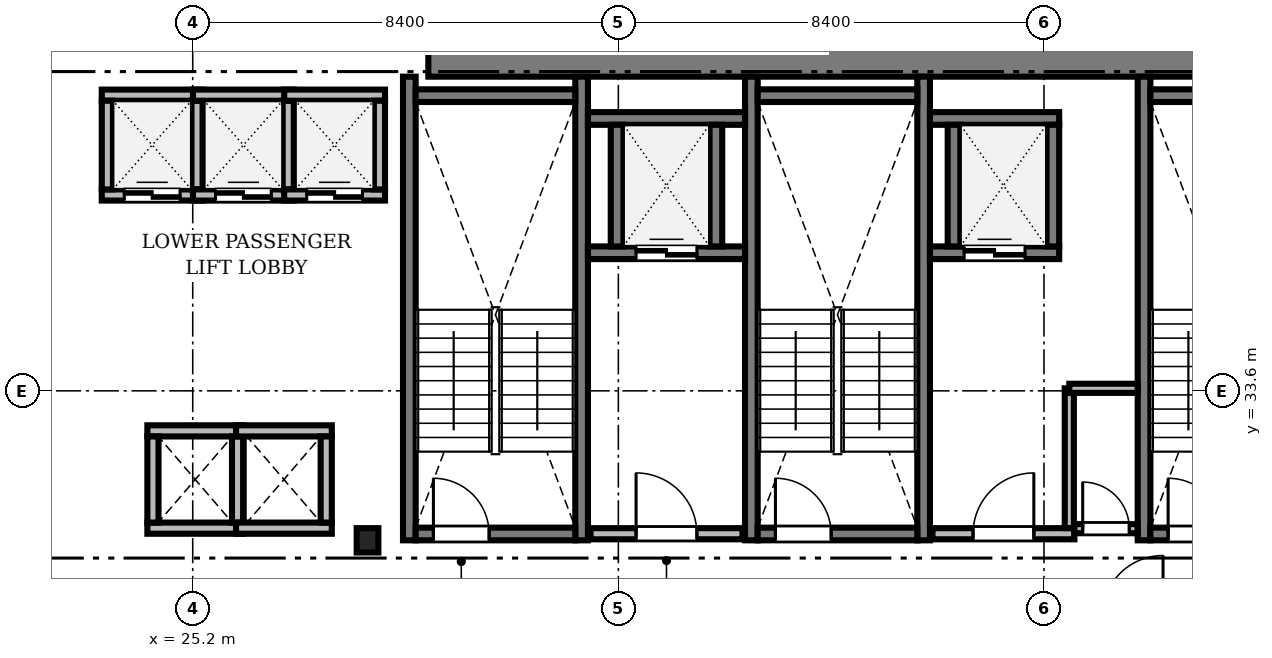
"""IFC4 building model, lengths in metres.
Left out: names, types, materials, properties, quantities, classifications, styles, units other than length and angle.
Written with IfcOpenShell. Run it as: python <this file> out.ifc"""

import sys

from ifc_helpers import new_model, si_unit, direction, frame, frame_2d, origin, origin_2d, place, context, subcontext, project, spatial, rectangle, i_section, extrude, source, transform, mapped, element, fill, save


model = new_model("IFC4")
c1 = context("Model", 3, precision=1e-05, world=origin(), true_north=direction((0.0, 1.0)))
c2 = subcontext(c1, "Body", "Model", "MODEL_VIEW")
j1 = project(units=[si_unit("LENGTHUNIT", "METRE"), si_unit("PLANEANGLEUNIT", "RADIAN")], contexts=[c1])
p1 = place(None, origin())
s1 = spatial("IfcSite", under=j1, at=p1, CompositionType="ELEMENT")
p2 = place(p1, origin())
s2 = spatial("IfcBuilding", under=s1, at=p2, CompositionType="ELEMENT")
p3 = place(p2, frame((0.0, 0.0, 49.5)))
s3 = spatial("IfcBuildingStorey", under=s2, at=p3, CompositionType="ELEMENT", Elevation=49.5)
m1 = source(origin(), c2, "Body", "SweptSolid", [
    extrude(rectangle(XDim=17.52, YDim=1.0, at=frame_2d((8.76, 0.0))), origin(), (0.0, 0.0, 1.0), 3.41),
])
p4 = place(p3, frame((29.85, 40.3, 0.0), z_axis=(0.0, 0.0, 1.0), x_axis=(1.0, 0.0, 0.0)))
e1 = element("IfcWall", 1, at=p4, inside=s3, PredefinedType="SHEAR", context=c2, shape_type="MappedRepresentation", body=[
    mapped(m1, transform((0.0, 0.0, 0.0), scale=1.0)),
])
m2 = source(origin(), c2, "Body", "SweptSolid", [
    extrude(i_section(OverallWidth=0.428, OverallDepth=0.481, WebThickness=0.04, FlangeThickness=0.063, FilletRadius=0.015, at=origin_2d()), origin(), (0.0, 0.0, 1.0), 3.41),
])
p5 = place(p3, frame((28.65, 30.65, 0.0), z_axis=(0.0, 0.0, 1.0), x_axis=(1.0, 0.0, 0.0)))
e2 = element("IfcColumn", 2, at=p5, inside=s3, PredefinedType="COLUMN", context=c2, shape_type="MappedRepresentation", body=[
    mapped(m2, transform((0.0, 0.0, 0.0), scale=1.0)),
])
m3 = source(origin(), c2, "Body", "SweptSolid", [
    extrude(rectangle(XDim=9.15, YDim=0.25, at=frame_2d((4.575, 0.0))), origin(), (0.0, 0.0, 1.0), 3.45),
])
for number, where, z_axis, x_axis in (
    (3, (29.475, 30.65, 0.0), (0.0, 0.0, 1.0), (0.0, 1.0, 0.0)),
    (4, (32.875, 30.65, 0.0), (0.0, 0.0, 1.0), (0.0, 1.0, 0.0)),
):
    element("IfcWall", number, at=place(p3, frame(where, z_axis=z_axis, x_axis=x_axis)), inside=s3, PredefinedType="SOLIDWALL", context=c2, shape_type="MappedRepresentation", body=[
        mapped(m3, transform((0.0, 0.0, 0.0), scale=1.0)),
    ])
m4 = source(origin(), c2, "Body", "SweptSolid", [
    extrude(rectangle(XDim=3.15, YDim=0.25, at=frame_2d((1.575, 0.0))), origin(), (0.0, 0.0, 1.0), 3.45),
])
p6 = place(p3, frame((29.6, 39.425, 0.0), z_axis=(0.0, 0.0, 1.0), x_axis=(1.0, 0.0, 0.0)))
e5 = element("IfcWall", 5, at=p6, inside=s3, PredefinedType="SOLIDWALL", context=c2, shape_type="MappedRepresentation", body=[
    mapped(m4, transform((0.0, 0.0, 0.0), scale=1.0)),
])
p7 = place(p3, frame((29.6, 30.775, 0.0), z_axis=(0.0, 0.0, 1.0), x_axis=(1.0, 0.0, 0.0)))
e6 = element("IfcWall", 6, at=p7, inside=s3, PredefinedType="SOLIDWALL", context=c2, shape_type="MappedRepresentation", body=[
    mapped(m4, transform((0.0, 0.0, 0.0), scale=1.0)),
])
m5 = source(origin(), c2, "Body", "SweptSolid", [
    extrude(rectangle(XDim=1.1, YDim=2.2, at=frame_2d((0.55, 1.1))), frame((0.0, 0.135, 0.0), z_axis=(0.0, -1.0, 0.0), x_axis=(1.0, 0.0, 0.0)), (0.0, 0.0, 1.0), 0.27),
])
p8 = place(p7, frame((0.35, 0.0, 0.0)))
e7 = element("IfcOpeningElement", 7, at=p8, cuts=e6, PredefinedType="OPENING", context=c2, shape_type="MappedRepresentation", body=[
    mapped(m5, transform((0.0, 0.0, 0.0), scale=1.0)),
])
for number, where, z_axis, x_axis in (
    (8, (36.225, 30.65, 0.0), (0.0, 0.0, 1.0), (0.0, 1.0, 0.0)),
    (9, (39.625, 30.65, 0.0), (0.0, 0.0, 1.0), (0.0, 1.0, 0.0)),
):
    element("IfcWall", number, at=place(p3, frame(where, z_axis=z_axis, x_axis=x_axis)), inside=s3, PredefinedType="SOLIDWALL", context=c2, shape_type="MappedRepresentation", body=[
        mapped(m3, transform((0.0, 0.0, 0.0), scale=1.0)),
    ])
p9 = place(p3, frame((36.35, 39.425, 0.0), z_axis=(0.0, 0.0, 1.0), x_axis=(1.0, 0.0, 0.0)))
e10 = element("IfcWall", 10, at=p9, inside=s3, PredefinedType="SOLIDWALL", context=c2, shape_type="MappedRepresentation", body=[
    mapped(m4, transform((0.0, 0.0, 0.0), scale=1.0)),
])
p10 = place(p3, frame((36.35, 30.775, 0.0), z_axis=(0.0, 0.0, 1.0), x_axis=(1.0, 0.0, 0.0)))
e11 = element("IfcWall", 11, at=p10, inside=s3, PredefinedType="SOLIDWALL", context=c2, shape_type="MappedRepresentation", body=[
    mapped(m4, transform((0.0, 0.0, 0.0), scale=1.0)),
])
p11 = place(p10, frame((0.35, 0.0, 0.0)))
e12 = element("IfcOpeningElement", 12, at=p11, cuts=e11, PredefinedType="OPENING", context=c2, shape_type="MappedRepresentation", body=[
    mapped(m5, transform((0.0, 0.0, 0.0), scale=1.0)),
])
p12 = place(p3, frame((43.975, 30.65, 0.0), z_axis=(0.0, 0.0, 1.0), x_axis=(0.0, 1.0, 0.0)))
e13 = element("IfcWall", 13, at=p12, inside=s3, PredefinedType="SOLIDWALL", context=c2, shape_type="MappedRepresentation", body=[
    mapped(m3, transform((0.0, 0.0, 0.0), scale=1.0)),
])
p13 = place(p3, frame((44.1, 39.425, 0.0), z_axis=(0.0, 0.0, 1.0), x_axis=(1.0, 0.0, 0.0)))
e14 = element("IfcWall", 14, at=p13, inside=s3, PredefinedType="SOLIDWALL", context=c2, shape_type="MappedRepresentation", body=[
    mapped(m4, transform((0.0, 0.0, 0.0), scale=1.0)),
])
p14 = place(p3, frame((44.1, 30.775, 0.0), z_axis=(0.0, 0.0, 1.0), x_axis=(1.0, 0.0, 0.0)))
e15 = element("IfcWall", 15, at=p14, inside=s3, PredefinedType="SOLIDWALL", context=c2, shape_type="MappedRepresentation", body=[
    mapped(m4, transform((0.0, 0.0, 0.0), scale=1.0)),
])
p15 = place(p14, frame((0.35, 0.0, 0.0)))
e16 = element("IfcOpeningElement", 16, at=p15, cuts=e15, PredefinedType="OPENING", context=c2, shape_type="MappedRepresentation", body=[
    mapped(m5, transform((0.0, 0.0, 0.0), scale=1.0)),
])
m6 = source(origin(), c2, "Body", "SweptSolid", [
    extrude(rectangle(XDim=3.0, YDim=0.22, at=frame_2d((1.5, 0.0))), origin(), (0.0, 0.0, 1.0), 3.41),
])
p16 = place(p3, frame((33.05, 30.78, 0.0), z_axis=(0.0, 0.0, 1.0), x_axis=(1.0, 0.0, 0.0)))
e17 = element("IfcWall", 17, at=p16, inside=s3, PredefinedType="SOLIDWALL", context=c2, shape_type="MappedRepresentation", body=[
    mapped(m6, transform((0.0, 0.0, 0.0), scale=1.0)),
])
m7 = source(origin(), c2, "Body", "SweptSolid", [
    extrude(rectangle(XDim=1.2, YDim=2.2, at=frame_2d((0.6, 1.1))), frame((0.0, 0.12, 0.0), z_axis=(0.0, -1.0, 0.0), x_axis=(1.0, 0.0, 0.0)), (0.0, 0.0, 1.0), 0.24),
])
p17 = place(p16, frame((0.9, 0.0, 0.0)))
e18 = element("IfcOpeningElement", 18, at=p17, cuts=e17, PredefinedType="OPENING", context=c2, shape_type="MappedRepresentation", body=[
    mapped(m7, transform((0.0, 0.0, 0.0), scale=1.0)),
])
m8 = source(origin(), c2, "Body", "SweptSolid", [
    extrude(rectangle(XDim=2.8, YDim=0.22, at=frame_2d((1.4, 0.0))), origin(), (0.0, 0.0, 1.0), 3.41),
])
p18 = place(p3, frame((39.8, 30.78, 0.0), z_axis=(0.0, 0.0, 1.0), x_axis=(1.0, 0.0, 0.0)))
e19 = element("IfcWall", 19, at=p18, inside=s3, PredefinedType="SOLIDWALL", context=c2, shape_type="MappedRepresentation", body=[
    mapped(m8, transform((0.0, 0.0, 0.0), scale=1.0)),
])
p19 = place(p18, frame((0.8, 0.0, 0.0)))
e20 = element("IfcOpeningElement", 20, at=p19, cuts=e19, PredefinedType="OPENING", context=c2, shape_type="MappedRepresentation", body=[
    mapped(m7, transform((0.0, 0.0, 0.0), scale=1.0)),
])
m9 = source(origin(), c2, "Body", "SweptSolid", [
    extrude(rectangle(XDim=1.99, YDim=0.22, at=frame_2d((0.995, 0.0))), origin(), (0.0, 0.0, 1.0), 3.41),
])
p20 = place(p3, frame((23.405, 37.465, 0.0), z_axis=(0.0, 0.0, 1.0), x_axis=(1.0, 0.0, 0.0)))
e21 = element("IfcWall", 21, at=p20, inside=s3, PredefinedType="SOLIDWALL", context=c2, shape_type="MappedRepresentation", body=[
    mapped(m9, transform((0.0, 0.0, 0.0), scale=1.0)),
])
m10 = source(origin(), c2, "Body", "SweptSolid", [
    extrude(rectangle(XDim=1.1, YDim=2.2, at=frame_2d((0.55, 1.1))), frame((0.0, 0.12, 0.0), z_axis=(0.0, -1.0, 0.0), x_axis=(1.0, 0.0, 0.0)), (0.0, 0.0, 1.0), 0.24),
])
p21 = place(p20, frame((0.445, 0.0, 0.0)))
e22 = element("IfcOpeningElement", 22, at=p21, cuts=e21, PredefinedType="OPENING", context=c2, shape_type="MappedRepresentation", body=[
    mapped(m10, transform((0.0, 0.0, 0.0), scale=1.0)),
])
p22 = place(p3, frame((23.405, 39.435, 0.0), z_axis=(0.0, 0.0, 1.0), x_axis=(1.0, 0.0, 0.0)))
e23 = element("IfcWall", 23, at=p22, inside=s3, PredefinedType="SOLIDWALL", context=c2, shape_type="MappedRepresentation", body=[
    mapped(m9, transform((0.0, 0.0, 0.0), scale=1.0)),
])
m11 = source(origin(), c2, "Body", "SweptSolid", [
    extrude(rectangle(XDim=1.75, YDim=0.22, at=frame_2d((0.875, 0.0))), origin(), (0.0, 0.0, 1.0), 3.41),
])
for number, where, z_axis, x_axis in (
    (24, (23.515, 37.575, 0.0), (0.0, 0.0, 1.0), (0.0, 1.0, 0.0)),
    (25, (25.285, 37.575, 0.0), (0.0, 0.0, 1.0), (0.0, 1.0, 0.0)),
):
    element("IfcWall", number, at=place(p3, frame(where, z_axis=z_axis, x_axis=x_axis)), inside=s3, PredefinedType="SOLIDWALL", context=c2, shape_type="MappedRepresentation", body=[
        mapped(m11, transform((0.0, 0.0, 0.0), scale=1.0)),
    ])
p23 = place(p3, frame((25.205, 37.465, 0.0), z_axis=(0.0, 0.0, 1.0), x_axis=(1.0, 0.0, 0.0)))
e26 = element("IfcWall", 26, at=p23, inside=s3, PredefinedType="SOLIDWALL", context=c2, shape_type="MappedRepresentation", body=[
    mapped(m9, transform((0.0, 0.0, 0.0), scale=1.0)),
])
p24 = place(p23, frame((0.445, 0.0, 0.0)))
e27 = element("IfcOpeningElement", 27, at=p24, cuts=e26, PredefinedType="OPENING", context=c2, shape_type="MappedRepresentation", body=[
    mapped(m10, transform((0.0, 0.0, 0.0), scale=1.0)),
])
p25 = place(p3, frame((25.205, 39.435, 0.0), z_axis=(0.0, 0.0, 1.0), x_axis=(1.0, 0.0, 0.0)))
e28 = element("IfcWall", 28, at=p25, inside=s3, PredefinedType="SOLIDWALL", context=c2, shape_type="MappedRepresentation", body=[
    mapped(m9, transform((0.0, 0.0, 0.0), scale=1.0)),
])
p26 = place(p3, frame((27.085, 37.575, 0.0), z_axis=(0.0, 0.0, 1.0), x_axis=(0.0, 1.0, 0.0)))
e29 = element("IfcWall", 29, at=p26, inside=s3, PredefinedType="SOLIDWALL", context=c2, shape_type="MappedRepresentation", body=[
    mapped(m11, transform((0.0, 0.0, 0.0), scale=1.0)),
])
m12 = source(origin(), c2, "Body", "SweptSolid", [
    extrude(rectangle(XDim=1.99, YDim=0.22, at=frame_2d((0.995, 0.0))), origin(), (0.0, 0.0, 1.0), 3.41),
])
p27 = place(p3, frame((27.005, 37.465, 0.0), z_axis=(0.0, 0.0, 1.0), x_axis=(1.0, 0.0, 0.0)))
e30 = element("IfcWall", 30, at=p27, inside=s3, PredefinedType="SOLIDWALL", context=c2, shape_type="MappedRepresentation", body=[
    mapped(m12, transform((0.0, 0.0, 0.0), scale=1.0)),
])
p28 = place(p27, frame((0.445, 0.0, 0.0)))
e31 = element("IfcOpeningElement", 31, at=p28, cuts=e30, PredefinedType="OPENING", context=c2, shape_type="MappedRepresentation", body=[
    mapped(m10, transform((0.0, 0.0, 0.0), scale=1.0)),
])
p29 = place(p3, frame((27.005, 39.435, 0.0), z_axis=(0.0, 0.0, 1.0), x_axis=(1.0, 0.0, 0.0)))
e32 = element("IfcWall", 32, at=p29, inside=s3, PredefinedType="SOLIDWALL", context=c2, shape_type="MappedRepresentation", body=[
    mapped(m12, transform((0.0, 0.0, 0.0), scale=1.0)),
])
p30 = place(p3, frame((28.885, 37.575, 0.0), z_axis=(0.0, 0.0, 1.0), x_axis=(0.0, 1.0, 0.0)))
e33 = element("IfcWall", 33, at=p30, inside=s3, PredefinedType="SOLIDWALL", context=c2, shape_type="MappedRepresentation", body=[
    mapped(m11, transform((0.0, 0.0, 0.0), scale=1.0)),
])
m13 = source(origin(), c2, "Body", "SweptSolid", [
    extrude(rectangle(XDim=3.1, YDim=0.25, at=frame_2d((1.55, 0.0))), origin(), (0.0, 0.0, 1.0), 3.41),
])
p31 = place(p3, frame((33.0, 36.325, 0.0), z_axis=(0.0, 0.0, 1.0), x_axis=(1.0, 0.0, 0.0)))
e34 = element("IfcWall", 34, at=p31, inside=s3, PredefinedType="SOLIDWALL", context=c2, shape_type="MappedRepresentation", body=[
    mapped(m13, transform((0.0, 0.0, 0.0), scale=1.0)),
])
m14 = source(origin(), c2, "Body", "SweptSolid", [
    extrude(rectangle(XDim=1.2, YDim=2.25, at=frame_2d((0.6, 1.125))), frame((0.0, 0.135, 0.0), z_axis=(0.0, -1.0, 0.0), x_axis=(1.0, 0.0, 0.0)), (0.0, 0.0, 1.0), 0.27),
])
p32 = place(p31, frame((0.95, 0.0, 0.0)))
e35 = element("IfcOpeningElement", 35, at=p32, cuts=e34, PredefinedType="OPENING", context=c2, shape_type="MappedRepresentation", body=[
    mapped(m14, transform((0.0, 0.0, 0.0), scale=1.0)),
])
p33 = place(p3, frame((33.0, 38.975, 0.0), z_axis=(0.0, 0.0, 1.0), x_axis=(1.0, 0.0, 0.0)))
e36 = element("IfcWall", 36, at=p33, inside=s3, PredefinedType="SOLIDWALL", context=c2, shape_type="MappedRepresentation", body=[
    mapped(m13, transform((0.0, 0.0, 0.0), scale=1.0)),
])
m15 = source(origin(), c2, "Body", "SweptSolid", [
    extrude(rectangle(XDim=2.4, YDim=0.25, at=frame_2d((1.2, 0.0))), origin(), (0.0, 0.0, 1.0), 3.41),
])
for number, where, z_axis, x_axis in (
    (37, (33.575, 36.45, 0.0), (0.0, 0.0, 1.0), (0.0, 1.0, 0.0)),
    (38, (35.525, 36.45, 0.0), (0.0, 0.0, 1.0), (0.0, 1.0, 0.0)),
):
    element("IfcWall", number, at=place(p3, frame(where, z_axis=z_axis, x_axis=x_axis)), inside=s3, PredefinedType="SOLIDWALL", context=c2, shape_type="MappedRepresentation", body=[
        mapped(m15, transform((0.0, 0.0, 0.0), scale=1.0)),
    ])
m16 = source(origin(), c2, "Body", "SweptSolid", [
    extrude(rectangle(XDim=2.55, YDim=0.25, at=frame_2d((1.275, 0.0))), origin(), (0.0, 0.0, 1.0), 3.41),
])
p34 = place(p3, frame((39.75, 36.325, 0.0), z_axis=(0.0, 0.0, 1.0), x_axis=(1.0, 0.0, 0.0)))
e39 = element("IfcWall", 39, at=p34, inside=s3, PredefinedType="SOLIDWALL", context=c2, shape_type="MappedRepresentation", body=[
    mapped(m16, transform((0.0, 0.0, 0.0), scale=1.0)),
])
p35 = place(p34, frame((0.675, 0.0, 0.0)))
e40 = element("IfcOpeningElement", 40, at=p35, cuts=e39, PredefinedType="OPENING", context=c2, shape_type="MappedRepresentation", body=[
    mapped(m14, transform((0.0, 0.0, 0.0), scale=1.0)),
])
p36 = place(p3, frame((39.75, 38.975, 0.0), z_axis=(0.0, 0.0, 1.0), x_axis=(1.0, 0.0, 0.0)))
e41 = element("IfcWall", 41, at=p36, inside=s3, PredefinedType="SOLIDWALL", context=c2, shape_type="MappedRepresentation", body=[
    mapped(m16, transform((0.0, 0.0, 0.0), scale=1.0)),
])
for number, where, z_axis, x_axis in (
    (42, (40.225, 36.45, 0.0), (0.0, 0.0, 1.0), (0.0, 1.0, 0.0)),
    (43, (42.175, 36.45, 0.0), (0.0, 0.0, 1.0), (0.0, 1.0, 0.0)),
):
    element("IfcWall", number, at=place(p3, frame(where, z_axis=z_axis, x_axis=x_axis)), inside=s3, PredefinedType="SOLIDWALL", context=c2, shape_type="MappedRepresentation", body=[
        mapped(m15, transform((0.0, 0.0, 0.0), scale=1.0)),
    ])
m17 = source(origin(), c2, "Body", "SweptSolid", [
    extrude(rectangle(XDim=1.89, YDim=0.22, at=frame_2d((0.945, 0.0))), origin(), (0.0, 0.0, 1.0), 3.41),
])
for number, where, z_axis, x_axis in (
    (44, (24.305, 30.89, 0.0), (0.0, 0.0, 1.0), (1.0, 0.0, 0.0)),
    (45, (24.305, 32.81, 0.0), (0.0, 0.0, 1.0), (1.0, 0.0, 0.0)),
):
    element("IfcWall", number, at=place(p3, frame(where, z_axis=z_axis, x_axis=x_axis)), inside=s3, PredefinedType="SOLIDWALL", context=c2, shape_type="MappedRepresentation", body=[
        mapped(m17, transform((0.0, 0.0, 0.0), scale=1.0)),
    ])
m18 = source(origin(), c2, "Body", "SweptSolid", [
    extrude(rectangle(XDim=1.7, YDim=0.22, at=frame_2d((0.85, 0.0))), origin(), (0.0, 0.0, 1.0), 3.41),
])
for number, where, z_axis, x_axis in (
    (46, (24.415, 31.0, 0.0), (0.0, 0.0, 1.0), (0.0, 1.0, 0.0)),
    (47, (26.085, 31.0, 0.0), (0.0, 0.0, 1.0), (0.0, 1.0, 0.0)),
):
    element("IfcWall", number, at=place(p3, frame(where, z_axis=z_axis, x_axis=x_axis)), inside=s3, PredefinedType="SOLIDWALL", context=c2, shape_type="MappedRepresentation", body=[
        mapped(m18, transform((0.0, 0.0, 0.0), scale=1.0)),
    ])
for number, where, z_axis, x_axis in (
    (48, (26.055, 30.89, 0.0), (0.0, 0.0, 1.0), (1.0, 0.0, 0.0)),
    (49, (26.055, 32.81, 0.0), (0.0, 0.0, 1.0), (1.0, 0.0, 0.0)),
):
    element("IfcWall", number, at=place(p3, frame(where, z_axis=z_axis, x_axis=x_axis)), inside=s3, PredefinedType="SOLIDWALL", context=c2, shape_type="MappedRepresentation", body=[
        mapped(m17, transform((0.0, 0.0, 0.0), scale=1.0)),
    ])
p37 = place(p3, frame((27.835, 31.0, 0.0), z_axis=(0.0, 0.0, 1.0), x_axis=(0.0, 1.0, 0.0)))
e50 = element("IfcWall", 50, at=p37, inside=s3, PredefinedType="SOLIDWALL", context=c2, shape_type="MappedRepresentation", body=[
    mapped(m18, transform((0.0, 0.0, 0.0), scale=1.0)),
])
m19 = source(origin(), c2, "Body", "SweptSolid", [
    extrude(rectangle(XDim=1.248, YDim=0.18, at=frame_2d((0.624, 0.0))), origin(), (0.0, 0.0, 1.0), 3.41),
])
p38 = place(p3, frame((42.6, 30.88, 0.0), z_axis=(0.0, 0.0, 1.0), x_axis=(1.0, 0.0, 0.0)))
e51 = element("IfcWall", 51, at=p38, inside=s3, PredefinedType="PARTITIONING", context=c2, shape_type="MappedRepresentation", body=[
    mapped(m19, transform((0.0, 0.0, 0.0), scale=1.0)),
])
m20 = source(origin(), c2, "Body", "SweptSolid", [
    extrude(rectangle(XDim=0.92, YDim=2.1, at=frame_2d((0.46, 1.05))), frame((0.0, 0.1, 0.0), z_axis=(0.0, -1.0, 0.0), x_axis=(1.0, 0.0, 0.0)), (0.0, 0.0, 1.0), 0.2),
])
p39 = place(p38, frame((0.164, 0.0, 0.0)))
e52 = element("IfcOpeningElement", 52, at=p39, cuts=e51, PredefinedType="OPENING", context=c2, shape_type="MappedRepresentation", body=[
    mapped(m20, transform((0.0, 0.0, 0.0), scale=1.0)),
])
m21 = source(origin(), c2, "Body", "SweptSolid", [
    extrude(rectangle(XDim=2.758, YDim=0.18, at=frame_2d((1.379, 0.0))), origin(), (0.0, 0.0, 1.0), 3.41),
])
p40 = place(p3, frame((42.5, 30.892, 0.0), z_axis=(0.0, 0.0, 1.0), x_axis=(0.0, 1.0, 0.0)))
e53 = element("IfcWall", 53, at=p40, inside=s3, PredefinedType="PARTITIONING", context=c2, shape_type="MappedRepresentation", body=[
    mapped(m21, transform((0.0, 0.0, 0.0), scale=1.0)),
])
m22 = source(origin(), c2, "Body", "SweptSolid", [
    extrude(rectangle(XDim=1.348, YDim=0.18, at=frame_2d((0.674, 0.0))), origin(), (0.0, 0.0, 1.0), 3.41),
])
p41 = place(p3, frame((42.5, 33.65, 0.0), z_axis=(0.0, 0.0, 1.0), x_axis=(1.0, 0.0, 0.0)))
e54 = element("IfcWall", 54, at=p41, inside=s3, PredefinedType="PARTITIONING", context=c2, shape_type="MappedRepresentation", body=[
    mapped(m22, transform((0.0, 0.0, 0.0), scale=1.0)),
])
m23 = source(origin(), c2, "Body", "SweptSolid", [
    extrude(rectangle(XDim=1.1, YDim=2.2, at=frame_2d((0.55, 1.1))), frame((0.0, 0.025, 0.0), z_axis=(0.0, -1.0, 0.0), x_axis=(1.0, 0.0, 0.0)), (0.0, 0.0, 1.0), 0.05),
])
p42 = place(p8, origin())
e55 = element("IfcDoor", 55, at=p42, inside=s3, OperationType="SINGLE_SWING_LEFT", PredefinedType="DOOR", context=c2, shape_type="MappedRepresentation", body=[
    mapped(m23, transform((0.0, 0.0, 0.0), scale=1.0)),
])
fill(e7, e55)
p43 = place(p11, origin())
e56 = element("IfcDoor", 56, at=p43, inside=s3, OperationType="SINGLE_SWING_LEFT", PredefinedType="DOOR", context=c2, shape_type="MappedRepresentation", body=[
    mapped(m23, transform((0.0, 0.0, 0.0), scale=1.0)),
])
fill(e12, e56)
p44 = place(p15, origin())
e57 = element("IfcDoor", 57, at=p44, inside=s3, OperationType="SINGLE_SWING_LEFT", PredefinedType="DOOR", context=c2, shape_type="MappedRepresentation", body=[
    mapped(m23, transform((0.0, 0.0, 0.0), scale=1.0)),
])
fill(e16, e57)
m24 = source(origin(), c2, "Body", "SweptSolid", [
    extrude(rectangle(XDim=1.2, YDim=2.2, at=frame_2d((0.6, 1.1))), frame((0.0, 0.025, 0.0), z_axis=(0.0, -1.0, 0.0), x_axis=(1.0, 0.0, 0.0)), (0.0, 0.0, 1.0), 0.05),
])
p45 = place(p17, origin())
e58 = element("IfcDoor", 58, at=p45, inside=s3, OperationType="SINGLE_SWING_LEFT", PredefinedType="DOOR", context=c2, shape_type="MappedRepresentation", body=[
    mapped(m24, transform((0.0, 0.0, 0.0), scale=1.0)),
])
fill(e18, e58)
p46 = place(p19, origin())
e59 = element("IfcDoor", 59, at=p46, inside=s3, OperationType="SINGLE_SWING_RIGHT", PredefinedType="DOOR", context=c2, shape_type="MappedRepresentation", body=[
    mapped(m24, transform((0.0, 0.0, 0.0), scale=1.0)),
])
fill(e20, e59)
p47 = place(p21, origin())
e60 = element("IfcDoor", 60, at=p47, inside=s3, OperationType="DOUBLE_DOOR_SLIDING", PredefinedType="DOOR", context=c2, shape_type="MappedRepresentation", body=[
    mapped(m23, transform((0.0, 0.0, 0.0), scale=1.0)),
])
fill(e22, e60)
p48 = place(p24, origin())
e61 = element("IfcDoor", 61, at=p48, inside=s3, OperationType="DOUBLE_DOOR_SLIDING", PredefinedType="DOOR", context=c2, shape_type="MappedRepresentation", body=[
    mapped(m23, transform((0.0, 0.0, 0.0), scale=1.0)),
])
fill(e27, e61)
p49 = place(p28, origin())
e62 = element("IfcDoor", 62, at=p49, inside=s3, OperationType="DOUBLE_DOOR_SLIDING", PredefinedType="DOOR", context=c2, shape_type="MappedRepresentation", body=[
    mapped(m23, transform((0.0, 0.0, 0.0), scale=1.0)),
])
fill(e31, e62)
m25 = source(origin(), c2, "Body", "SweptSolid", [
    extrude(rectangle(XDim=1.2, YDim=2.25, at=frame_2d((0.6, 1.125))), frame((0.0, 0.025, 0.0), z_axis=(0.0, -1.0, 0.0), x_axis=(1.0, 0.0, 0.0)), (0.0, 0.0, 1.0), 0.05),
])
p50 = place(p32, origin())
e63 = element("IfcDoor", 63, at=p50, inside=s3, OperationType="DOUBLE_DOOR_SLIDING", PredefinedType="DOOR", context=c2, shape_type="MappedRepresentation", body=[
    mapped(m25, transform((0.0, 0.0, 0.0), scale=1.0)),
])
fill(e35, e63)
p51 = place(p35, origin())
e64 = element("IfcDoor", 64, at=p51, inside=s3, OperationType="DOUBLE_DOOR_SLIDING", PredefinedType="DOOR", context=c2, shape_type="MappedRepresentation", body=[
    mapped(m25, transform((0.0, 0.0, 0.0), scale=1.0)),
])
fill(e40, e64)
m26 = source(origin(), c2, "Body", "SweptSolid", [
    extrude(rectangle(XDim=0.92, YDim=2.1, at=frame_2d((0.46, 1.05))), frame((0.0, 0.025, 0.0), z_axis=(0.0, -1.0, 0.0), x_axis=(1.0, 0.0, 0.0)), (0.0, 0.0, 1.0), 0.05),
])
p52 = place(p39, origin())
e65 = element("IfcDoor", 65, at=p52, inside=s3, OperationType="SINGLE_SWING_LEFT", PredefinedType="DOOR", context=c2, shape_type="MappedRepresentation", body=[
    mapped(m26, transform((0.0, 0.0, 0.0), scale=1.0)),
])
fill(e52, e65)
save(model, sys.argv[1])
